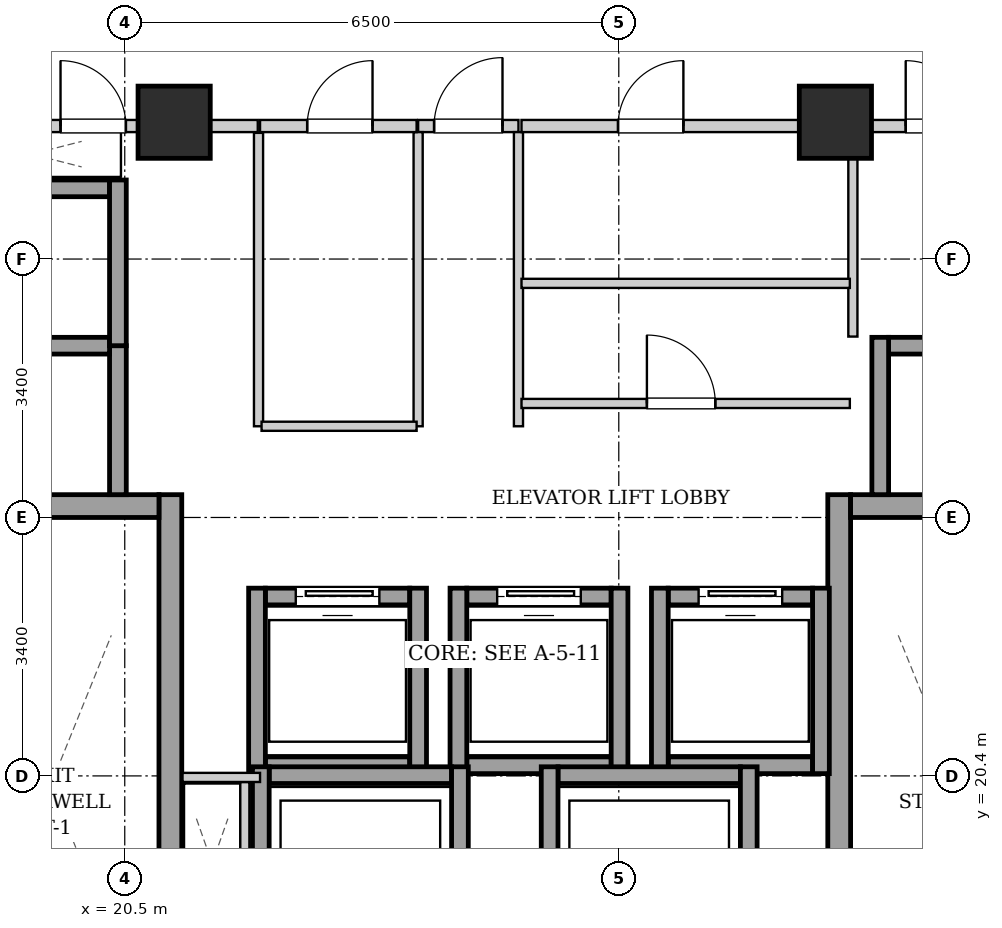
"""IFC4 building model, lengths in metres.
Left out: names, types, materials, properties, quantities, classifications, styles, units other than length and angle.
Written with IfcOpenShell. Run it as: python <this file> out.ifc"""

import sys

from ifc_helpers import new_model, si_unit, direction, frame, frame_2d, origin, origin_2d, place, context, subcontext, project, spatial, rectangle, extrude, element, fill, save


model = new_model("IFC4")
c1 = context("Model", 3, precision=1e-05, world=origin(), true_north=direction((0.0, 1.0)))
c2 = subcontext(c1, "Body", "Model", "MODEL_VIEW")
j1 = project(units=[si_unit("LENGTHUNIT", "METRE"), si_unit("PLANEANGLEUNIT", "RADIAN")], contexts=[c1])
p1 = place(None, origin())
s1 = spatial("IfcSite", under=j1, at=p1, CompositionType="ELEMENT")
p2 = place(p1, origin())
s2 = spatial("IfcBuilding", under=s1, at=p2, CompositionType="ELEMENT")
p3 = place(p2, frame((0.0, 0.0, 153.65)))
s3 = spatial("IfcBuildingStorey", under=s2, at=p3, CompositionType="ELEMENT", Elevation=153.65)
for number, where, z_axis, x_axis in (
    (1, (21.15, 29.0, 0.0), (0.0, 0.0, 1.0), (1.0, 0.0, 0.0)),
    (2, (29.85, 29.0, 0.0), (0.0, 0.0, 1.0), (1.0, 0.0, 0.0)),
):
    element("IfcColumn", number, at=place(p3, frame(where, z_axis=z_axis, x_axis=x_axis)), inside=s3, PredefinedType="COLUMN", context=c2, shape_type="SweptSolid", body=[
        extrude(rectangle(XDim=0.95, YDim=0.95, at=origin_2d()), origin(), (0.0, 0.0, 1.0), 3.25),
    ])
p4 = place(p3, frame((21.1, 15.1, 0.0), z_axis=(0.0, 0.0, 1.0), x_axis=(0.0, 1.0, 0.0)))
e3 = element("IfcWall", 3, at=p4, inside=s3, PredefinedType="SHEAR", context=c2, shape_type="SweptSolid", body=[
    extrude(rectangle(XDim=9.0, YDim=0.3, at=frame_2d((4.5, 0.0))), origin(), (0.0, 0.0, 1.0), 2.99),
])
p5 = place(p3, frame((18.1, 23.95, 0.0), z_axis=(0.0, 0.0, 1.0), x_axis=(1.0, 0.0, 0.0)))
e4 = element("IfcWall", 4, at=p5, inside=s3, PredefinedType="SHEAR", context=c2, shape_type="SweptSolid", body=[
    extrude(rectangle(XDim=2.85, YDim=0.3, at=frame_2d((1.425, 0.0))), origin(), (0.0, 0.0, 1.0), 2.99),
])
p6 = place(p3, frame((29.9, 15.1, 0.0), z_axis=(0.0, 0.0, 1.0), x_axis=(0.0, 1.0, 0.0)))
e5 = element("IfcWall", 5, at=p6, inside=s3, PredefinedType="SHEAR", context=c2, shape_type="SweptSolid", body=[
    extrude(rectangle(XDim=9.0, YDim=0.3, at=frame_2d((4.5, 0.0))), origin(), (0.0, 0.0, 1.0), 2.99),
])
p7 = place(p3, frame((30.05, 23.95, 0.0), z_axis=(0.0, 0.0, 1.0), x_axis=(1.0, 0.0, 0.0)))
e6 = element("IfcWall", 6, at=p7, inside=s3, PredefinedType="SHEAR", context=c2, shape_type="SweptSolid", body=[
    extrude(rectangle(XDim=2.85, YDim=0.3, at=frame_2d((1.425, 0.0))), origin(), (0.0, 0.0, 1.0), 2.99),
])
p8 = place(p3, frame((22.35, 20.54, 0.0), z_axis=(0.0, 0.0, 1.0), x_axis=(1.0, 0.0, 0.0)))
e7 = element("IfcWall", 7, at=p8, inside=s3, PredefinedType="SHEAR", context=c2, shape_type="SweptSolid", body=[
    extrude(rectangle(XDim=1.9, YDim=0.22, at=frame_2d((0.95, 0.0))), origin(), (0.0, 0.0, 1.0), 2.99),
])
p9 = place(p3, frame((22.35, 22.76, 0.0), z_axis=(0.0, 0.0, 1.0), x_axis=(1.0, 0.0, 0.0)))
e8 = element("IfcWall", 8, at=p9, inside=s3, PredefinedType="SHEAR", context=c2, shape_type="SweptSolid", body=[
    extrude(rectangle(XDim=1.9, YDim=0.22, at=frame_2d((0.95, 0.0))), origin(), (0.0, 0.0, 1.0), 2.99),
])
p10 = place(p9, frame((0.4, 0.0, 0.0)))
e9 = element("IfcOpeningElement", 9, at=p10, cuts=e8, PredefinedType="OPENING", context=c2, shape_type="SweptSolid", body=[
    extrude(rectangle(XDim=1.1, YDim=2.15, at=frame_2d((0.55, 1.075))), frame((0.0, 0.12, 0.0), z_axis=(0.0, -1.0, 0.0), x_axis=(1.0, 0.0, 0.0)), (0.0, 0.0, 1.0), 0.24),
])
for number, where, z_axis, x_axis in (
    (10, (22.24, 20.43, 0.0), (0.0, 0.0, 1.0), (0.0, 1.0, 0.0)),
    (11, (24.36, 20.43, 0.0), (0.0, 0.0, 1.0), (0.0, 1.0, 0.0)),
):
    element("IfcWall", number, at=place(p3, frame(where, z_axis=z_axis, x_axis=x_axis)), inside=s3, PredefinedType="SHEAR", context=c2, shape_type="SweptSolid", body=[
        extrude(rectangle(XDim=2.44, YDim=0.22, at=frame_2d((1.22, 0.0))), origin(), (0.0, 0.0, 1.0), 2.99),
    ])
p11 = place(p3, frame((25.0, 20.54, 0.0), z_axis=(0.0, 0.0, 1.0), x_axis=(1.0, 0.0, 0.0)))
e12 = element("IfcWall", 12, at=p11, inside=s3, PredefinedType="SHEAR", context=c2, shape_type="SweptSolid", body=[
    extrude(rectangle(XDim=1.9, YDim=0.22, at=frame_2d((0.95, 0.0))), origin(), (0.0, 0.0, 1.0), 2.99),
])
p12 = place(p3, frame((25.0, 22.76, 0.0), z_axis=(0.0, 0.0, 1.0), x_axis=(1.0, 0.0, 0.0)))
e13 = element("IfcWall", 13, at=p12, inside=s3, PredefinedType="SHEAR", context=c2, shape_type="SweptSolid", body=[
    extrude(rectangle(XDim=1.9, YDim=0.22, at=frame_2d((0.95, 0.0))), origin(), (0.0, 0.0, 1.0), 2.99),
])
p13 = place(p12, frame((0.4, 0.0, 0.0)))
e14 = element("IfcOpeningElement", 14, at=p13, cuts=e13, PredefinedType="OPENING", context=c2, shape_type="SweptSolid", body=[
    extrude(rectangle(XDim=1.1, YDim=2.15, at=frame_2d((0.55, 1.075))), frame((0.0, 0.12, 0.0), z_axis=(0.0, -1.0, 0.0), x_axis=(1.0, 0.0, 0.0)), (0.0, 0.0, 1.0), 0.24),
])
for number, where, z_axis, x_axis in (
    (15, (24.89, 20.43, 0.0), (0.0, 0.0, 1.0), (0.0, 1.0, 0.0)),
    (16, (27.01, 20.43, 0.0), (0.0, 0.0, 1.0), (0.0, 1.0, 0.0)),
):
    element("IfcWall", number, at=place(p3, frame(where, z_axis=z_axis, x_axis=x_axis)), inside=s3, PredefinedType="SHEAR", context=c2, shape_type="SweptSolid", body=[
        extrude(rectangle(XDim=2.44, YDim=0.22, at=frame_2d((1.22, 0.0))), origin(), (0.0, 0.0, 1.0), 2.99),
    ])
p14 = place(p3, frame((27.65, 20.54, 0.0), z_axis=(0.0, 0.0, 1.0), x_axis=(1.0, 0.0, 0.0)))
e17 = element("IfcWall", 17, at=p14, inside=s3, PredefinedType="SHEAR", context=c2, shape_type="SweptSolid", body=[
    extrude(rectangle(XDim=1.9, YDim=0.22, at=frame_2d((0.95, 0.0))), origin(), (0.0, 0.0, 1.0), 2.99),
])
p15 = place(p3, frame((27.65, 22.76, 0.0), z_axis=(0.0, 0.0, 1.0), x_axis=(1.0, 0.0, 0.0)))
e18 = element("IfcWall", 18, at=p15, inside=s3, PredefinedType="SHEAR", context=c2, shape_type="SweptSolid", body=[
    extrude(rectangle(XDim=1.9, YDim=0.22, at=frame_2d((0.95, 0.0))), origin(), (0.0, 0.0, 1.0), 2.99),
])
p16 = place(p15, frame((0.4, 0.0, 0.0)))
e19 = element("IfcOpeningElement", 19, at=p16, cuts=e18, PredefinedType="OPENING", context=c2, shape_type="SweptSolid", body=[
    extrude(rectangle(XDim=1.1, YDim=2.15, at=frame_2d((0.55, 1.075))), frame((0.0, 0.12, 0.0), z_axis=(0.0, -1.0, 0.0), x_axis=(1.0, 0.0, 0.0)), (0.0, 0.0, 1.0), 0.24),
])
for number, where, z_axis, x_axis in (
    (20, (27.54, 20.43, 0.0), (0.0, 0.0, 1.0), (0.0, 1.0, 0.0)),
    (21, (29.66, 20.43, 0.0), (0.0, 0.0, 1.0), (0.0, 1.0, 0.0)),
):
    element("IfcWall", number, at=place(p3, frame(where, z_axis=z_axis, x_axis=x_axis)), inside=s3, PredefinedType="SHEAR", context=c2, shape_type="SweptSolid", body=[
        extrude(rectangle(XDim=2.44, YDim=0.22, at=frame_2d((1.22, 0.0))), origin(), (0.0, 0.0, 1.0), 2.99),
    ])
p17 = place(p3, frame((20.41, 24.1, 0.0), z_axis=(0.0, 0.0, 1.0), x_axis=(0.0, 1.0, 0.0)))
e22 = element("IfcWall", 22, at=p17, inside=s3, PredefinedType="SHEAR", context=c2, shape_type="SweptSolid", body=[
    extrude(rectangle(XDim=1.96, YDim=0.22, at=frame_2d((0.98, 0.0))), origin(), (0.0, 0.0, 1.0), 2.99),
])
for number, where, z_axis, x_axis in (
    (23, (18.4, 26.06, 0.0), (0.0, 0.0, 1.0), (1.0, 0.0, 0.0)),
    (24, (18.4, 28.13, 0.0), (0.0, 0.0, 1.0), (1.0, 0.0, 0.0)),
):
    element("IfcWall", number, at=place(p3, frame(where, z_axis=z_axis, x_axis=x_axis)), inside=s3, PredefinedType="SHEAR", context=c2, shape_type="SweptSolid", body=[
        extrude(rectangle(XDim=1.9, YDim=0.22, at=frame_2d((0.95, 0.0))), origin(), (0.0, 0.0, 1.0), 2.99),
    ])
p18 = place(p3, frame((20.41, 26.06, 0.0), z_axis=(0.0, 0.0, 1.0), x_axis=(0.0, 1.0, 0.0)))
e25 = element("IfcWall", 25, at=p18, inside=s3, PredefinedType="SHEAR", context=c2, shape_type="SweptSolid", body=[
    extrude(rectangle(XDim=2.18, YDim=0.22, at=frame_2d((1.09, 0.0))), origin(), (0.0, 0.0, 1.0), 2.99),
])
p19 = place(p3, frame((30.55, 26.06, 0.0), z_axis=(0.0, 0.0, 1.0), x_axis=(1.0, 0.0, 0.0)))
e26 = element("IfcWall", 26, at=p19, inside=s3, PredefinedType="SHEAR", context=c2, shape_type="SweptSolid", body=[
    extrude(rectangle(XDim=1.9, YDim=0.22, at=frame_2d((0.95, 0.0))), origin(), (0.0, 0.0, 1.0), 2.99),
])
p20 = place(p3, frame((30.44, 24.1, 0.0), z_axis=(0.0, 0.0, 1.0), x_axis=(0.0, 1.0, 0.0)))
e27 = element("IfcWall", 27, at=p20, inside=s3, PredefinedType="SHEAR", context=c2, shape_type="SweptSolid", body=[
    extrude(rectangle(XDim=2.07, YDim=0.22, at=frame_2d((1.035, 0.0))), origin(), (0.0, 0.0, 1.0), 2.99),
])
p21 = place(p3, frame((22.4, 20.41, 0.0), z_axis=(0.0, 0.0, 1.0), x_axis=(1.0, 0.0, 0.0)))
e28 = element("IfcWall", 28, at=p21, inside=s3, PredefinedType="SHEAR", context=c2, shape_type="SweptSolid", body=[
    extrude(rectangle(XDim=2.4, YDim=0.22, at=frame_2d((1.2, 0.0))), origin(), (0.0, 0.0, 1.0), 2.99),
])
for number, where, z_axis, x_axis in (
    (29, (22.29, 17.98, 0.0), (0.0, 0.0, 1.0), (0.0, 1.0, 0.0)),
    (30, (24.91, 17.98, 0.0), (0.0, 0.0, 1.0), (0.0, 1.0, 0.0)),
):
    element("IfcWall", number, at=place(p3, frame(where, z_axis=z_axis, x_axis=x_axis)), inside=s3, PredefinedType="SHEAR", context=c2, shape_type="SweptSolid", body=[
        extrude(rectangle(XDim=2.54, YDim=0.22, at=frame_2d((1.27, 0.0))), origin(), (0.0, 0.0, 1.0), 2.99),
    ])
p22 = place(p3, frame((26.2, 20.41, 0.0), z_axis=(0.0, 0.0, 1.0), x_axis=(1.0, 0.0, 0.0)))
e31 = element("IfcWall", 31, at=p22, inside=s3, PredefinedType="SHEAR", context=c2, shape_type="SweptSolid", body=[
    extrude(rectangle(XDim=2.4, YDim=0.22, at=frame_2d((1.2, 0.0))), origin(), (0.0, 0.0, 1.0), 2.99),
])
for number, where, z_axis, x_axis in (
    (32, (26.09, 17.98, 0.0), (0.0, 0.0, 1.0), (0.0, 1.0, 0.0)),
    (33, (28.71, 17.98, 0.0), (0.0, 0.0, 1.0), (0.0, 1.0, 0.0)),
):
    element("IfcWall", number, at=place(p3, frame(where, z_axis=z_axis, x_axis=x_axis)), inside=s3, PredefinedType="SHEAR", context=c2, shape_type="SweptSolid", body=[
        extrude(rectangle(XDim=2.54, YDim=0.22, at=frame_2d((1.27, 0.0))), origin(), (0.0, 0.0, 1.0), 2.99),
    ])
p23 = place(p3, frame((24.36, 28.95, 0.0), z_axis=(0.0, 0.0, 1.0), x_axis=(1.0, 0.0, 0.0)))
e34 = element("IfcWall", 34, at=p23, inside=s3, PredefinedType="PARTITIONING", context=c2, shape_type="SweptSolid", body=[
    extrude(rectangle(XDim=1.32, YDim=0.16, at=frame_2d((0.66, 0.0))), origin(), (0.0, 0.0, 1.0), 2.442),
])
p24 = place(p23, frame((0.21, 0.0, 0.0)))
e35 = element("IfcOpeningElement", 35, at=p24, cuts=e34, PredefinedType="OPENING", context=c2, shape_type="SweptSolid", body=[
    extrude(rectangle(XDim=0.9, YDim=2.05, at=frame_2d((0.45, 1.025))), frame((0.0, 0.09, 0.0), z_axis=(0.0, -1.0, 0.0), x_axis=(1.0, 0.0, 0.0)), (0.0, 0.0, 1.0), 0.18),
])
p25 = place(p3, frame((17.96, 28.95, 0.0), z_axis=(0.0, 0.0, 1.0), x_axis=(1.0, 0.0, 0.0)))
e36 = element("IfcWall", 36, at=p25, inside=s3, PredefinedType="PARTITIONING", context=c2, shape_type="SweptSolid", body=[
    extrude(rectangle(XDim=4.29, YDim=0.16, at=frame_2d((2.145, 0.0))), origin(), (0.0, 0.0, 1.0), 2.442),
])
p26 = place(p25, frame((1.695, 0.0, 0.0)))
e37 = element("IfcOpeningElement", 37, at=p26, cuts=e36, PredefinedType="OPENING", context=c2, shape_type="SweptSolid", body=[
    extrude(rectangle(XDim=0.86, YDim=2.05, at=frame_2d((0.43, 1.025))), frame((0.0, 0.09, 0.0), z_axis=(0.0, -1.0, 0.0), x_axis=(1.0, 0.0, 0.0)), (0.0, 0.0, 1.0), 0.18),
])
p27 = place(p3, frame((22.08, 18.2, 0.0), z_axis=(0.0, 0.0, 1.0), x_axis=(0.0, 1.0, 0.0)))
e38 = element("IfcWall", 38, at=p27, inside=s3, PredefinedType="PARTITIONING", context=c2, shape_type="SweptSolid", body=[
    extrude(rectangle(XDim=2.12, YDim=0.12, at=frame_2d((1.06, 0.0))), origin(), (0.0, 0.0, 1.0), 2.99),
])
p28 = place(p3, frame((22.28, 20.38, 0.0), z_axis=(0.0, 0.0, 1.0), x_axis=(-1.0, 0.0, 0.0)))
e39 = element("IfcWall", 39, at=p28, inside=s3, PredefinedType="PARTITIONING", context=c2, shape_type="SweptSolid", body=[
    extrude(rectangle(XDim=1.02, YDim=0.12, at=frame_2d((0.51, 0.0))), origin(), (0.0, 0.0, 1.0), 2.99),
])
for number, where, z_axis, x_axis in (
    (40, (24.36, 25.0, 0.0), (0.0, 0.0, 1.0), (0.0, 1.0, 0.0)),
    (41, (25.68, 25.0, 0.0), (0.0, 0.0, 1.0), (0.0, 1.0, 0.0)),
):
    element("IfcWall", number, at=place(p3, frame(where, z_axis=z_axis, x_axis=x_axis)), inside=s3, PredefinedType="PARTITIONING", context=c2, shape_type="SweptSolid", body=[
        extrude(rectangle(XDim=3.87, YDim=0.12, at=frame_2d((1.935, 0.0))), origin(), (0.0, 0.0, 1.0), 2.99),
    ])
p29 = place(p3, frame((30.08, 26.18, 0.0), z_axis=(0.0, 0.0, 1.0), x_axis=(0.0, 1.0, 0.0)))
e42 = element("IfcWall", 42, at=p29, inside=s3, PredefinedType="PARTITIONING", context=c2, shape_type="SweptSolid", body=[
    extrude(rectangle(XDim=2.68, YDim=0.12, at=frame_2d((1.34, 0.0))), origin(), (0.0, 0.0, 1.0), 2.99),
])
p30 = place(p3, frame((30.08, 28.95, 0.0), z_axis=(0.0, 0.0, 1.0), x_axis=(1.0, 0.0, 0.0)))
e43 = element("IfcWall", 43, at=p30, inside=s3, PredefinedType="PARTITIONING", context=c2, shape_type="SweptSolid", body=[
    extrude(rectangle(XDim=2.96, YDim=0.16, at=frame_2d((1.48, 0.0))), origin(), (0.0, 0.0, 1.0), 2.99),
])
p31 = place(p30, frame((0.695, 0.0, 0.0)))
e44 = element("IfcOpeningElement", 44, at=p31, cuts=e43, PredefinedType="OPENING", context=c2, shape_type="SweptSolid", body=[
    extrude(rectangle(XDim=0.86, YDim=2.05, at=frame_2d((0.43, 1.025))), frame((0.0, 0.09, 0.0), z_axis=(0.0, -1.0, 0.0), x_axis=(1.0, 0.0, 0.0)), (0.0, 0.0, 1.0), 0.18),
])
p32 = place(p3, frame((22.26, 25.0, 0.0), z_axis=(0.0, 0.0, 1.0), x_axis=(0.0, 1.0, 0.0)))
e45 = element("IfcWall", 45, at=p32, inside=s3, PredefinedType="PARTITIONING", context=c2, shape_type="SweptSolid", body=[
    extrude(rectangle(XDim=3.86, YDim=0.12, at=frame_2d((1.93, 0.0))), origin(), (0.0, 0.0, 1.0), 2.99),
])
p33 = place(p3, frame((22.3, 25.0, 0.0), z_axis=(0.0, 0.0, 1.0), x_axis=(1.0, 0.0, 0.0)))
e46 = element("IfcWall", 46, at=p33, inside=s3, PredefinedType="PARTITIONING", context=c2, shape_type="SweptSolid", body=[
    extrude(rectangle(XDim=2.04, YDim=0.12, at=frame_2d((1.02, 0.0))), origin(), (0.0, 0.0, 1.0), 2.99),
])
p34 = place(p3, frame((22.28, 28.95, 0.0), z_axis=(0.0, 0.0, 1.0), x_axis=(1.0, 0.0, 0.0)))
e47 = element("IfcWall", 47, at=p34, inside=s3, PredefinedType="PARTITIONING", context=c2, shape_type="SweptSolid", body=[
    extrude(rectangle(XDim=2.06, YDim=0.16, at=frame_2d((1.03, 0.0))), origin(), (0.0, 0.0, 1.0), 2.442),
])
p35 = place(p34, frame((0.62, 0.0, 0.0)))
e48 = element("IfcOpeningElement", 48, at=p35, cuts=e47, PredefinedType="OPENING", context=c2, shape_type="SweptSolid", body=[
    extrude(rectangle(XDim=0.86, YDim=2.05, at=frame_2d((0.43, 1.025))), frame((0.0, 0.09, 0.0), z_axis=(0.0, -1.0, 0.0), x_axis=(1.0, 0.0, 0.0)), (0.0, 0.0, 1.0), 0.18),
])
p36 = place(p3, frame((25.72, 26.88, 0.0), z_axis=(0.0, 0.0, 1.0), x_axis=(1.0, 0.0, 0.0)))
e49 = element("IfcWall", 49, at=p36, inside=s3, PredefinedType="PARTITIONING", context=c2, shape_type="SweptSolid", body=[
    extrude(rectangle(XDim=4.32, YDim=0.12, at=frame_2d((2.16, 0.0))), origin(), (0.0, 0.0, 1.0), 2.99),
])
p37 = place(p3, frame((25.72, 25.3, 0.0), z_axis=(0.0, 0.0, 1.0), x_axis=(1.0, 0.0, 0.0)))
e50 = element("IfcWall", 50, at=p37, inside=s3, PredefinedType="PARTITIONING", context=c2, shape_type="SweptSolid", body=[
    extrude(rectangle(XDim=4.32, YDim=0.12, at=frame_2d((2.16, 0.0))), origin(), (0.0, 0.0, 1.0), 2.99),
])
p38 = place(p37, frame((1.65, 0.0, 0.0)))
e51 = element("IfcOpeningElement", 51, at=p38, cuts=e50, PredefinedType="OPENING", context=c2, shape_type="SweptSolid", body=[
    extrude(rectangle(XDim=0.9, YDim=2.05, at=frame_2d((0.45, 1.025))), frame((0.0, 0.07, 0.0), z_axis=(0.0, -1.0, 0.0), x_axis=(1.0, 0.0, 0.0)), (0.0, 0.0, 1.0), 0.14),
])
p39 = place(p3, frame((25.72, 28.95, 0.0), z_axis=(0.0, 0.0, 1.0), x_axis=(1.0, 0.0, 0.0)))
e52 = element("IfcWall", 52, at=p39, inside=s3, PredefinedType="PARTITIONING", context=c2, shape_type="SweptSolid", body=[
    extrude(rectangle(XDim=4.32, YDim=0.16, at=frame_2d((2.16, 0.0))), origin(), (0.0, 0.0, 1.0), 2.442),
])
p40 = place(p39, frame((1.27, 0.0, 0.0)))
e53 = element("IfcOpeningElement", 53, at=p40, cuts=e52, PredefinedType="OPENING", context=c2, shape_type="SweptSolid", body=[
    extrude(rectangle(XDim=0.86, YDim=2.05, at=frame_2d((0.43, 1.025))), frame((0.0, 0.09, 0.0), z_axis=(0.0, -1.0, 0.0), x_axis=(1.0, 0.0, 0.0)), (0.0, 0.0, 1.0), 0.18),
])
p41 = place(p10, origin())
e54 = element("IfcDoor", 54, at=p41, inside=s3, OperationType="SLIDING_TO_LEFT", PredefinedType="DOOR", context=c2, shape_type="SweptSolid", body=[
    extrude(rectangle(XDim=1.1, YDim=2.15, at=frame_2d((0.55, 1.075))), frame((0.0, 0.025, 0.0), z_axis=(0.0, -1.0, 0.0), x_axis=(1.0, 0.0, 0.0)), (0.0, 0.0, 1.0), 0.05),
])
fill(e9, e54)
p42 = place(p13, origin())
e55 = element("IfcDoor", 55, at=p42, inside=s3, OperationType="SLIDING_TO_LEFT", PredefinedType="DOOR", context=c2, shape_type="SweptSolid", body=[
    extrude(rectangle(XDim=1.1, YDim=2.15, at=frame_2d((0.55, 1.075))), frame((0.0, 0.025, 0.0), z_axis=(0.0, -1.0, 0.0), x_axis=(1.0, 0.0, 0.0)), (0.0, 0.0, 1.0), 0.05),
])
fill(e14, e55)
p43 = place(p16, origin())
e56 = element("IfcDoor", 56, at=p43, inside=s3, OperationType="SLIDING_TO_LEFT", PredefinedType="DOOR", context=c2, shape_type="SweptSolid", body=[
    extrude(rectangle(XDim=1.1, YDim=2.15, at=frame_2d((0.55, 1.075))), frame((0.0, 0.025, 0.0), z_axis=(0.0, -1.0, 0.0), x_axis=(1.0, 0.0, 0.0)), (0.0, 0.0, 1.0), 0.05),
])
fill(e19, e56)
p44 = place(p24, origin())
e57 = element("IfcDoor", 57, at=p44, inside=s3, OperationType="SINGLE_SWING_RIGHT", PredefinedType="DOOR", context=c2, shape_type="SweptSolid", body=[
    extrude(rectangle(XDim=0.9, YDim=2.05, at=frame_2d((0.45, 1.025))), frame((0.0, 0.025, 0.0), z_axis=(0.0, -1.0, 0.0), x_axis=(1.0, 0.0, 0.0)), (0.0, 0.0, 1.0), 0.05),
])
fill(e35, e57)
p45 = place(p26, origin())
e58 = element("IfcDoor", 58, at=p45, inside=s3, OperationType="SINGLE_SWING_LEFT", PredefinedType="DOOR", context=c2, shape_type="SweptSolid", body=[
    extrude(rectangle(XDim=0.86, YDim=2.05, at=frame_2d((0.43, 1.025))), frame((0.0, 0.025, 0.0), z_axis=(0.0, -1.0, 0.0), x_axis=(1.0, 0.0, 0.0)), (0.0, 0.0, 1.0), 0.05),
])
fill(e37, e58)
p46 = place(p31, origin())
e59 = element("IfcDoor", 59, at=p46, inside=s3, OperationType="SINGLE_SWING_LEFT", PredefinedType="DOOR", context=c2, shape_type="SweptSolid", body=[
    extrude(rectangle(XDim=0.86, YDim=2.05, at=frame_2d((0.43, 1.025))), frame((0.0, 0.025, 0.0), z_axis=(0.0, -1.0, 0.0), x_axis=(1.0, 0.0, 0.0)), (0.0, 0.0, 1.0), 0.05),
])
fill(e44, e59)
p47 = place(p35, origin())
e60 = element("IfcDoor", 60, at=p47, inside=s3, OperationType="SINGLE_SWING_RIGHT", PredefinedType="DOOR", context=c2, shape_type="SweptSolid", body=[
    extrude(rectangle(XDim=0.86, YDim=2.05, at=frame_2d((0.43, 1.025))), frame((0.0, 0.025, 0.0), z_axis=(0.0, -1.0, 0.0), x_axis=(1.0, 0.0, 0.0)), (0.0, 0.0, 1.0), 0.05),
])
fill(e48, e60)
p48 = place(p38, origin())
e61 = element("IfcDoor", 61, at=p48, inside=s3, OperationType="SINGLE_SWING_LEFT", PredefinedType="DOOR", context=c2, shape_type="SweptSolid", body=[
    extrude(rectangle(XDim=0.9, YDim=2.05, at=frame_2d((0.45, 1.025))), frame((0.0, 0.025, 0.0), z_axis=(0.0, -1.0, 0.0), x_axis=(1.0, 0.0, 0.0)), (0.0, 0.0, 1.0), 0.05),
])
fill(e51, e61)
p49 = place(p40, origin())
e62 = element("IfcDoor", 62, at=p49, inside=s3, OperationType="SINGLE_SWING_RIGHT", PredefinedType="DOOR", context=c2, shape_type="SweptSolid", body=[
    extrude(rectangle(XDim=0.86, YDim=2.05, at=frame_2d((0.43, 1.025))), frame((0.0, 0.025, 0.0), z_axis=(0.0, -1.0, 0.0), x_axis=(1.0, 0.0, 0.0)), (0.0, 0.0, 1.0), 0.05),
])
fill(e53, e62)
save(model, sys.argv[1])
